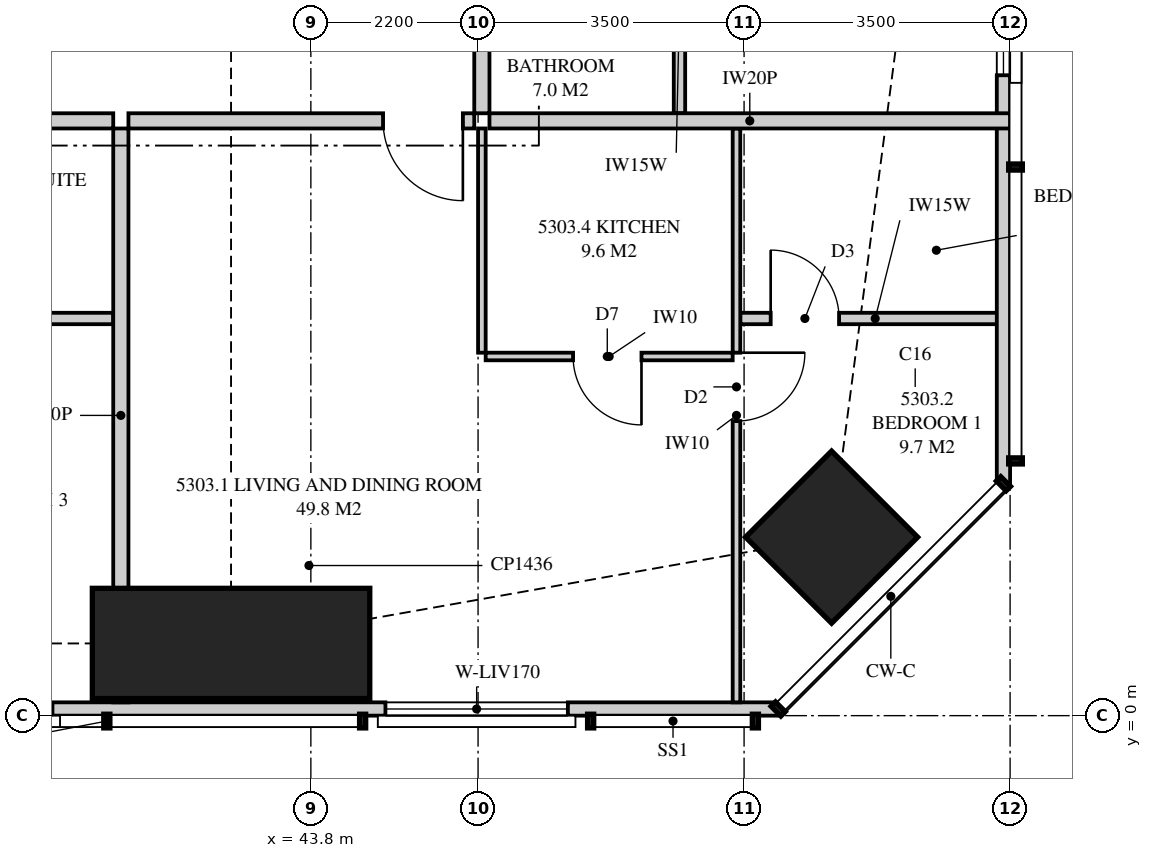
"""IFC4 building model, lengths in metres.
Left out: names, types, materials, properties, quantities, classifications, styles, units other than length and angle.
Written with IfcOpenShell. Run it as: python <this file> out.ifc"""

import sys

from ifc_helpers import new_model, si_unit, direction, frame, frame_2d, origin, origin_2d, place, context, subcontext, project, spatial, polyline, rectangle, outline, extrude, element, fill, save


model = new_model("IFC4")
c1 = context("Model", 3, precision=1e-05, world=origin(), true_north=direction((0.0, 1.0)))
c2 = subcontext(c1, "Body", "Model", "MODEL_VIEW")
j1 = project(units=[si_unit("LENGTHUNIT", "METRE"), si_unit("PLANEANGLEUNIT", "RADIAN")], contexts=[c1])
p1 = place(None, origin())
s1 = spatial("IfcSite", under=j1, at=p1, CompositionType="ELEMENT")
p2 = place(p1, origin())
s2 = spatial("IfcBuilding", under=s1, at=p2, CompositionType="ELEMENT")
p3 = place(p2, frame((0.0, 0.0, 194.55)))
s3 = spatial("IfcBuildingStorey", under=s2, at=p3, CompositionType="ELEMENT", Elevation=194.55)
p4 = place(p3, frame((42.75, 0.95, 0.0), z_axis=(0.0, 0.0, 1.0), x_axis=(0.0, 1.0, 0.0)))
e1 = element("IfcColumn", 1, at=p4, inside=s3, PredefinedType="COLUMN", context=c2, shape_type="SweptSolid", body=[
    extrude(rectangle(XDim=1.45, YDim=3.65, at=origin_2d()), origin(), (0.0, 0.0, 1.0), 3.35),
])
p5 = place(p3, frame((50.652, 2.348, 0.0), z_axis=(0.0, 0.0, 1.0), x_axis=(0.707106781187, 0.707106781187, 0.0)))
e2 = element("IfcColumn", 2, at=p5, inside=s3, PredefinedType="COLUMN", context=c2, shape_type="SweptSolid", body=[
    extrude(rectangle(XDim=1.6, YDim=1.6, at=origin_2d()), origin(), (0.0, 0.0, 1.0), 3.35),
])
p6 = place(p3, frame((15.051, 0.087, 0.0), z_axis=(0.0, 0.0, 1.0), x_axis=(1.0, 0.0, 0.0)))
e3 = element("IfcWall", 3, at=p6, inside=s3, PredefinedType="SOLIDWALL", context=c2, shape_type="SweptSolid", body=[
    extrude(outline(polyline([(0.0, 0.0), (34.897, 0.0), (34.897, 3.11), (27.91, 3.11), (27.91, 2.15), (27.836, 2.15), (27.836, 3.11), (27.699, 3.11), (27.699, 2.15), (7.199, 2.15), (7.199, 3.11), (7.062, 3.11), (7.062, 2.15), (6.987, 2.15), (6.987, 3.11), (0.0, 3.11), (0.0, 0.0)])), frame((0.0, 0.087, 0.0), z_axis=(0.0, -1.0, 0.0), x_axis=(1.0, 0.0, 0.0)), (0.0, 0.0, 1.0), 0.175),
])
p7 = place(p6, frame((0.613, 0.0, 0.4)))
e4 = element("IfcOpeningElement", 4, at=p7, cuts=e3, PredefinedType="OPENING", context=c2, shape_type="SweptSolid", body=[
    extrude(rectangle(XDim=1.2, YDim=1.7, at=frame_2d((0.6, 0.85))), frame((0.0, 0.097, 0.0), z_axis=(0.0, -1.0, 0.0), x_axis=(1.0, 0.0, 0.0)), (0.0, 0.0, 1.0), 0.195),
])
p8 = place(p6, frame((3.349, 0.0, 0.4)))
e5 = element("IfcOpeningElement", 5, at=p8, cuts=e3, PredefinedType="OPENING", context=c2, shape_type="SweptSolid", body=[
    extrude(rectangle(XDim=1.8, YDim=1.7, at=frame_2d((0.9, 0.85))), frame((0.0, 0.097, 0.0), z_axis=(0.0, -1.0, 0.0), x_axis=(1.0, 0.0, 0.0)), (0.0, 0.0, 1.0), 0.195),
])
p9 = place(p6, frame((9.13, 0.0, 0.4)))
e6 = element("IfcOpeningElement", 6, at=p9, cuts=e3, PredefinedType="OPENING", context=c2, shape_type="SweptSolid", body=[
    extrude(rectangle(XDim=1.8, YDim=1.7, at=frame_2d((0.9, 0.85))), frame((0.0, 0.097, 0.0), z_axis=(0.0, -1.0, 0.0), x_axis=(1.0, 0.0, 0.0)), (0.0, 0.0, 1.0), 0.195),
])
p10 = place(p6, frame((13.561, 0.0, 0.0)))
e7 = element("IfcOpeningElement", 7, at=p10, cuts=e3, PredefinedType="OPENING", context=c2, shape_type="SweptSolid", body=[
    extrude(rectangle(XDim=1.8, YDim=2.1, at=frame_2d((0.9, 1.05))), frame((0.0, 0.097, 0.0), z_axis=(0.0, -1.0, 0.0), x_axis=(1.0, 0.0, 0.0)), (0.0, 0.0, 1.0), 0.195),
])
p11 = place(p6, frame((11.799, 0.0, 0.4)))
e8 = element("IfcOpeningElement", 8, at=p11, cuts=e3, PredefinedType="OPENING", context=c2, shape_type="SweptSolid", body=[
    extrude(rectangle(XDim=1.2, YDim=1.7, at=frame_2d((0.6, 0.85))), frame((0.0, 0.097, 0.0), z_axis=(0.0, -1.0, 0.0), x_axis=(1.0, 0.0, 0.0)), (0.0, 0.0, 1.0), 0.195),
])
p12 = place(p6, frame((19.949, 0.0, 0.4)))
e9 = element("IfcOpeningElement", 9, at=p12, cuts=e3, PredefinedType="OPENING", context=c2, shape_type="SweptSolid", body=[
    extrude(rectangle(XDim=1.8, YDim=1.7, at=frame_2d((0.9, 0.85))), frame((0.0, 0.097, 0.0), z_axis=(0.0, -1.0, 0.0), x_axis=(1.0, 0.0, 0.0)), (0.0, 0.0, 1.0), 0.195),
])
p13 = place(p6, frame((23.549, 0.0, 0.4)))
e10 = element("IfcOpeningElement", 10, at=p13, cuts=e3, PredefinedType="OPENING", context=c2, shape_type="SweptSolid", body=[
    extrude(rectangle(XDim=1.8, YDim=1.7, at=frame_2d((0.9, 0.85))), frame((0.0, 0.097, 0.0), z_axis=(0.0, -1.0, 0.0), x_axis=(1.0, 0.0, 0.0)), (0.0, 0.0, 1.0), 0.195),
])
p14 = place(p6, frame((29.73, 0.0, 0.4)))
e11 = element("IfcOpeningElement", 11, at=p14, cuts=e3, PredefinedType="OPENING", context=c2, shape_type="SweptSolid", body=[
    extrude(rectangle(XDim=2.4, YDim=1.7, at=frame_2d((1.2, 0.85))), frame((0.0, 0.097, 0.0), z_axis=(0.0, -1.0, 0.0), x_axis=(1.0, 0.0, 0.0)), (0.0, 0.0, 1.0), 0.195),
])
p15 = place(p3, frame((52.913, 3.051, 0.0), z_axis=(0.0, 0.0, 1.0), x_axis=(0.0, 1.0, 0.0)))
e12 = element("IfcWall", 12, at=p15, inside=s3, PredefinedType="SOLIDWALL", context=c2, shape_type="SweptSolid", body=[
    extrude(outline(polyline([(0.0, 0.0), (29.897, 0.0), (29.897, 3.11), (22.167, 3.11), (22.167, 2.15), (22.074, 2.15), (22.074, 3.11), (21.949, 3.11), (21.949, 2.15), (9.949, 2.15), (9.949, 3.11), (9.847, 3.11), (9.847, 2.15), (9.706, 2.15), (9.706, 3.11), (0.0, 3.11), (0.0, 0.0)])), frame((0.0, 0.087, 0.0), z_axis=(0.0, -1.0, 0.0), x_axis=(1.0, 0.0, 0.0)), (0.0, 0.0, 1.0), 0.175),
])
p16 = place(p15, frame((5.374, 0.0, 0.4)))
e13 = element("IfcOpeningElement", 13, at=p16, cuts=e12, PredefinedType="OPENING", context=c2, shape_type="SweptSolid", body=[
    extrude(rectangle(XDim=1.8, YDim=1.7, at=frame_2d((0.9, 0.85))), frame((0.0, 0.097, 0.0), z_axis=(0.0, -1.0, 0.0), x_axis=(1.0, 0.0, 0.0)), (0.0, 0.0, 1.0), 0.195),
])
p17 = place(p15, frame((12.199, 0.0, 0.4)))
e14 = element("IfcOpeningElement", 14, at=p17, cuts=e12, PredefinedType="OPENING", context=c2, shape_type="SweptSolid", body=[
    extrude(rectangle(XDim=1.8, YDim=1.7, at=frame_2d((0.9, 0.85))), frame((0.0, 0.097, 0.0), z_axis=(0.0, -1.0, 0.0), x_axis=(1.0, 0.0, 0.0)), (0.0, 0.0, 1.0), 0.195),
])
p18 = place(p15, frame((15.324, 0.0, 0.0)))
e15 = element("IfcOpeningElement", 15, at=p18, cuts=e12, PredefinedType="OPENING", context=c2, shape_type="SweptSolid", body=[
    extrude(rectangle(XDim=1.8, YDim=2.1, at=frame_2d((0.9, 1.05))), frame((0.0, 0.097, 0.0), z_axis=(0.0, -1.0, 0.0), x_axis=(1.0, 0.0, 0.0)), (0.0, 0.0, 1.0), 0.195),
])
p19 = place(p15, frame((18.174, 0.0, 0.4)))
e16 = element("IfcOpeningElement", 16, at=p19, cuts=e12, PredefinedType="OPENING", context=c2, shape_type="SweptSolid", body=[
    extrude(rectangle(XDim=1.8, YDim=1.7, at=frame_2d((0.9, 0.85))), frame((0.0, 0.097, 0.0), z_axis=(0.0, -1.0, 0.0), x_axis=(1.0, 0.0, 0.0)), (0.0, 0.0, 1.0), 0.195),
])
p20 = place(p15, frame((23.886, 0.0, 0.4)))
e17 = element("IfcOpeningElement", 17, at=p20, cuts=e12, PredefinedType="OPENING", context=c2, shape_type="SweptSolid", body=[
    extrude(rectangle(XDim=1.8, YDim=1.7, at=frame_2d((0.9, 0.85))), frame((0.0, 0.097, 0.0), z_axis=(0.0, -1.0, 0.0), x_axis=(1.0, 0.0, 0.0)), (0.0, 0.0, 1.0), 0.195),
])
p21 = place(p15, frame((26.871, 0.0, 0.4)))
e18 = element("IfcOpeningElement", 18, at=p21, cuts=e12, PredefinedType="OPENING", context=c2, shape_type="SweptSolid", body=[
    extrude(rectangle(XDim=1.8, YDim=1.7, at=frame_2d((0.9, 0.85))), frame((0.0, 0.097, 0.0), z_axis=(0.0, -1.0, 0.0), x_axis=(1.0, 0.0, 0.0)), (0.0, 0.0, 1.0), 0.195),
])
p22 = place(p3, frame((41.3, 0.175, 0.0), z_axis=(0.0, 0.0, 1.0), x_axis=(0.0, 1.0, 0.0)))
e19 = element("IfcWall", 19, at=p22, inside=s3, PredefinedType="PARTITIONING", context=c2, shape_type="SweptSolid", body=[
    extrude(outline(polyline([(0.529, 2.15), (0.0, 2.15), (0.0, 0.0), (0.529, 0.0), (0.529, 0.032), (1.021, 0.032), (1.021, 0.0), (7.55, 0.0), (7.55, 3.11), (1.685, 3.11), (1.685, 2.15), (1.021, 2.15), (1.021, 2.118), (0.529, 2.118), (0.529, 2.15)])), frame((0.0, 0.1, 0.0), z_axis=(0.0, -1.0, 0.0), x_axis=(1.0, 0.0, 0.0)), (0.0, 0.0, 1.0), 0.2),
])
p23 = place(p3, frame((37.75, 5.225, 0.0), z_axis=(0.0, 0.0, 1.0), x_axis=(1.0, 0.0, 0.0)))
e20 = element("IfcWall", 20, at=p23, inside=s3, PredefinedType="PLUMBINGWALL", context=c2, shape_type="SweptSolid", body=[
    extrude(rectangle(XDim=3.45, YDim=0.15, at=frame_2d((1.725, 0.0))), origin(), (0.0, 0.0, 1.0), 3.11),
])
p24 = place(p23, frame((0.4, 0.0, 0.0)))
e21 = element("IfcOpeningElement", 21, at=p24, cuts=e20, PredefinedType="OPENING", context=c2, shape_type="SweptSolid", body=[
    extrude(rectangle(XDim=0.9, YDim=2.1, at=frame_2d((0.45, 1.05))), frame((0.0, 0.085, 0.0), z_axis=(0.0, -1.0, 0.0), x_axis=(1.0, 0.0, 0.0)), (0.0, 0.0, 1.0), 0.17),
])
p25 = place(p3, frame((41.4, 7.825, 0.0), z_axis=(0.0, 0.0, 1.0), x_axis=(1.0, 0.0, 0.0)))
e22 = element("IfcWall", 22, at=p25, inside=s3, PredefinedType="PARTITIONING", context=c2, shape_type="SweptSolid", body=[
    extrude(outline(polyline([(0.0, 0.0), (4.55, 0.0), (4.55, 3.11), (1.688, 3.11), (1.688, 2.541), (1.013, 2.541), (1.013, 3.11), (0.0, 3.11), (0.0, 0.0)])), frame((0.0, 0.1, 0.0), z_axis=(0.0, -1.0, 0.0), x_axis=(1.0, 0.0, 0.0)), (0.0, 0.0, 1.0), 0.2),
])
p26 = place(p25, frame((3.35, 0.0, 0.0)))
e23 = element("IfcOpeningElement", 23, at=p26, cuts=e22, PredefinedType="OPENING", context=c2, shape_type="SweptSolid", body=[
    extrude(rectangle(XDim=1.05, YDim=2.2, at=frame_2d((0.525, 1.1))), frame((0.0, 0.11, 0.0), z_axis=(0.0, -1.0, 0.0), x_axis=(1.0, 0.0, 0.0)), (0.0, 0.0, 1.0), 0.22),
])
p27 = place(p3, frame((49.4, 0.175, 0.0), z_axis=(0.0, 0.0, 1.0), x_axis=(0.0, 1.0, 0.0)))
e24 = element("IfcWall", 24, at=p27, inside=s3, PredefinedType="PARTITIONING", context=c2, shape_type="SweptSolid", body=[
    extrude(outline(polyline([(0.0, 0.0), (7.55, 0.0), (7.55, 3.11), (2.825, 3.11), (2.825, 2.15), (1.079, 2.15), (1.079, 3.11), (0.0, 3.11), (0.0, 0.0)])), frame((0.0, 0.05, 0.0), z_axis=(0.0, -1.0, 0.0), x_axis=(1.0, 0.0, 0.0)), (0.0, 0.0, 1.0), 0.1),
])
p28 = place(p27, frame((3.7, 0.0, 0.0)))
e25 = element("IfcOpeningElement", 25, at=p28, cuts=e24, PredefinedType="OPENING", context=c2, shape_type="SweptSolid", body=[
    extrude(rectangle(XDim=0.9, YDim=2.1, at=frame_2d((0.45, 1.05))), frame((0.0, 0.06, 0.0), z_axis=(0.0, -1.0, 0.0), x_axis=(1.0, 0.0, 0.0)), (0.0, 0.0, 1.0), 0.12),
])
p29 = place(p3, frame((49.45, 5.225, 0.0), z_axis=(0.0, 0.0, 1.0), x_axis=(1.0, 0.0, 0.0)))
e26 = element("IfcWall", 26, at=p29, inside=s3, PredefinedType="PLUMBINGWALL", context=c2, shape_type="SweptSolid", body=[
    extrude(outline(polyline([(0.0, 0.0), (3.55, 0.0), (3.55, 3.11), (2.472, 3.11), (2.472, 2.15), (0.687, 2.15), (0.687, 3.11), (0.0, 3.11), (0.0, 0.0)])), frame((0.0, 0.075, 0.0), z_axis=(0.0, -1.0, 0.0), x_axis=(1.0, 0.0, 0.0)), (0.0, 0.0, 1.0), 0.15),
])
p30 = place(p29, frame((0.4, 0.0, 0.0)))
e27 = element("IfcOpeningElement", 27, at=p30, cuts=e26, PredefinedType="OPENING", context=c2, shape_type="SweptSolid", body=[
    extrude(rectangle(XDim=0.9, YDim=2.1, at=frame_2d((0.45, 1.05))), frame((0.0, 0.085, 0.0), z_axis=(0.0, -1.0, 0.0), x_axis=(1.0, 0.0, 0.0)), (0.0, 0.0, 1.0), 0.17),
])
p31 = place(p3, frame((46.1, 4.725, 0.0), z_axis=(0.0, 0.0, 1.0), x_axis=(1.0, 0.0, 0.0)))
e28 = element("IfcWall", 28, at=p31, inside=s3, PredefinedType="PARTITIONING", context=c2, shape_type="SweptSolid", body=[
    extrude(rectangle(XDim=3.25, YDim=0.1, at=frame_2d((1.625, 0.0))), origin(), (0.0, 0.0, 1.0), 3.11),
])
p32 = place(p31, frame((1.15, 0.0, 0.0)))
e29 = element("IfcOpeningElement", 29, at=p32, cuts=e28, PredefinedType="OPENING", context=c2, shape_type="SweptSolid", body=[
    extrude(rectangle(XDim=0.9, YDim=2.1, at=frame_2d((0.45, 1.05))), frame((0.0, 0.06, 0.0), z_axis=(0.0, -1.0, 0.0), x_axis=(1.0, 0.0, 0.0)), (0.0, 0.0, 1.0), 0.12),
])
p33 = place(p3, frame((46.05, 4.775, 0.0), z_axis=(0.0, 0.0, 1.0), x_axis=(0.0, 1.0, 0.0)))
e30 = element("IfcWall", 30, at=p33, inside=s3, PredefinedType="PARTITIONING", context=c2, shape_type="SweptSolid", body=[
    extrude(rectangle(XDim=2.95, YDim=0.1, at=frame_2d((1.475, 0.0))), origin(), (0.0, 0.0, 1.0), 3.11),
])
p34 = place(p3, frame((46.15, 7.825, 0.0), z_axis=(0.0, 0.0, 1.0), x_axis=(1.0, 0.0, 0.0)))
e31 = element("IfcWall", 31, at=p34, inside=s3, PredefinedType="PARTITIONING", context=c2, shape_type="SweptSolid", body=[
    extrude(outline(polyline([(0.0, 0.0), (6.85, 0.0), (6.85, 3.11), (6.138, 3.11), (6.138, 2.15), (4.303, 2.15), (4.303, 3.11), (0.0, 3.11), (0.0, 0.0)])), frame((0.0, 0.1, 0.0), z_axis=(0.0, -1.0, 0.0), x_axis=(1.0, 0.0, 0.0)), (0.0, 0.0, 1.0), 0.2),
])
p35 = place(p3, frame((46.05, 7.925, 0.0), z_axis=(0.0, 0.0, 1.0), x_axis=(0.0, 1.0, 0.0)))
e32 = element("IfcWall", 32, at=p35, inside=s3, PredefinedType="PARTITIONING", context=c2, shape_type="SweptSolid", body=[
    extrude(outline(polyline([(0.0, 0.0), (21.15, 0.0), (21.15, 3.11), (17.412, 3.11), (17.412, 2.541), (16.738, 2.541), (16.738, 3.11), (5.412, 3.11), (5.412, 2.541), (4.738, 2.541), (4.738, 3.11), (0.0, 3.11), (0.0, 0.0)])), frame((0.0, 0.1, 0.0), z_axis=(0.0, -1.0, 0.0), x_axis=(1.0, 0.0, 0.0)), (0.0, 0.0, 1.0), 0.2),
])
p36 = place(p35, frame((10.075, 0.0, 0.0)))
e33 = element("IfcOpeningElement", 33, at=p36, cuts=e32, PredefinedType="OPENING", context=c2, shape_type="SweptSolid", body=[
    extrude(rectangle(XDim=1.05, YDim=2.2, at=frame_2d((0.525, 1.1))), frame((0.0, 0.11, 0.0), z_axis=(0.0, -1.0, 0.0), x_axis=(1.0, 0.0, 0.0)), (0.0, 0.0, 1.0), 0.22),
])
p37 = place(p3, frame((48.65, 7.925, 0.0), z_axis=(0.0, 0.0, 1.0), x_axis=(0.0, 1.0, 0.0)))
e34 = element("IfcWall", 34, at=p37, inside=s3, PredefinedType="PLUMBINGWALL", context=c2, shape_type="SweptSolid", body=[
    extrude(rectangle(XDim=2.85, YDim=0.15, at=frame_2d((1.425, 0.0))), origin(), (0.0, 0.0, 1.0), 3.11),
])
p38 = place(p37, frame((1.55, 0.0, 0.0)))
e35 = element("IfcOpeningElement", 35, at=p38, cuts=e34, PredefinedType="OPENING", context=c2, shape_type="SweptSolid", body=[
    extrude(rectangle(XDim=0.9, YDim=2.1, at=frame_2d((0.45, 1.05))), frame((0.0, 0.085, 0.0), z_axis=(0.0, -1.0, 0.0), x_axis=(1.0, 0.0, 0.0)), (0.0, 0.0, 1.0), 0.17),
])
p39 = place(p3, frame((32.6, 7.825, 0.0), z_axis=(0.0, 0.0, 1.0), x_axis=(1.0, 0.0, 0.0)))
e36 = element("IfcWall", 36, at=p39, inside=s3, PredefinedType="PARTITIONING", context=c2, shape_type="SweptSolid", body=[
    extrude(outline(polyline([(0.0, 0.0), (8.6, 0.0), (8.6, 3.11), (0.237, 3.11), (0.237, 2.541), (0.0, 2.541), (0.0, 3.11), (0.0, 0.0)])), frame((0.0, 0.1, 0.0), z_axis=(0.0, -1.0, 0.0), x_axis=(1.0, 0.0, 0.0)), (0.0, 0.0, 1.0), 0.2),
])
p40 = place(p14, origin())
e37 = element("IfcWindow", 37, at=p40, inside=s3, PartitioningType="SINGLE_PANEL", PredefinedType="WINDOW", context=c2, shape_type="SweptSolid", body=[
    extrude(rectangle(XDim=2.4, YDim=1.7, at=frame_2d((1.2, 0.85))), frame((0.0, 0.03, 0.0), z_axis=(0.0, -1.0, 0.0), x_axis=(1.0, 0.0, 0.0)), (0.0, 0.0, 1.0), 0.06),
])
fill(e11, e37)
p41 = place(p16, origin())
e38 = element("IfcWindow", 38, at=p41, inside=s3, PartitioningType="SINGLE_PANEL", PredefinedType="WINDOW", context=c2, shape_type="SweptSolid", body=[
    extrude(rectangle(XDim=1.8, YDim=1.7, at=frame_2d((0.9, 0.85))), frame((0.0, 0.03, 0.0), z_axis=(0.0, -1.0, 0.0), x_axis=(1.0, 0.0, 0.0)), (0.0, 0.0, 1.0), 0.06),
])
fill(e13, e38)
p42 = place(p26, frame((1.05, 0.0, 0.0), z_axis=(0.0, 0.0, 1.0), x_axis=(-1.0, 0.0, 0.0)))
e39 = element("IfcDoor", 39, at=p42, inside=s3, OperationType="SINGLE_SWING_LEFT", PredefinedType="DOOR", context=c2, shape_type="SweptSolid", body=[
    extrude(rectangle(XDim=1.05, YDim=2.2, at=frame_2d((0.525, 1.1))), frame((0.0, 0.025, 0.0), z_axis=(0.0, -1.0, 0.0), x_axis=(1.0, 0.0, 0.0)), (0.0, 0.0, 1.0), 0.05),
])
fill(e23, e39)
p43 = place(p28, frame((0.9, 0.0, 0.0), z_axis=(0.0, 0.0, 1.0), x_axis=(-1.0, 0.0, 0.0)))
e40 = element("IfcDoor", 40, at=p43, inside=s3, OperationType="SINGLE_SWING_LEFT", PredefinedType="DOOR", context=c2, shape_type="SweptSolid", body=[
    extrude(rectangle(XDim=0.9, YDim=2.1, at=frame_2d((0.45, 1.05))), frame((0.0, 0.025, 0.0), z_axis=(0.0, -1.0, 0.0), x_axis=(1.0, 0.0, 0.0)), (0.0, 0.0, 1.0), 0.05),
])
fill(e25, e40)
p44 = place(p30, origin())
e41 = element("IfcDoor", 41, at=p44, inside=s3, OperationType="SINGLE_SWING_LEFT", PredefinedType="DOOR", context=c2, shape_type="SweptSolid", body=[
    extrude(rectangle(XDim=0.9, YDim=2.1, at=frame_2d((0.45, 1.05))), frame((0.0, 0.025, 0.0), z_axis=(0.0, -1.0, 0.0), x_axis=(1.0, 0.0, 0.0)), (0.0, 0.0, 1.0), 0.05),
])
fill(e27, e41)
p45 = place(p32, frame((0.9, 0.0, 0.0), z_axis=(0.0, 0.0, 1.0), x_axis=(-1.0, 0.0, 0.0)))
e42 = element("IfcDoor", 42, at=p45, inside=s3, OperationType="SINGLE_SWING_LEFT", PredefinedType="DOOR", context=c2, shape_type="SweptSolid", body=[
    extrude(rectangle(XDim=0.9, YDim=2.1, at=frame_2d((0.45, 1.05))), frame((0.0, 0.025, 0.0), z_axis=(0.0, -1.0, 0.0), x_axis=(1.0, 0.0, 0.0)), (0.0, 0.0, 1.0), 0.05),
])
fill(e29, e42)
save(model, sys.argv[1])
